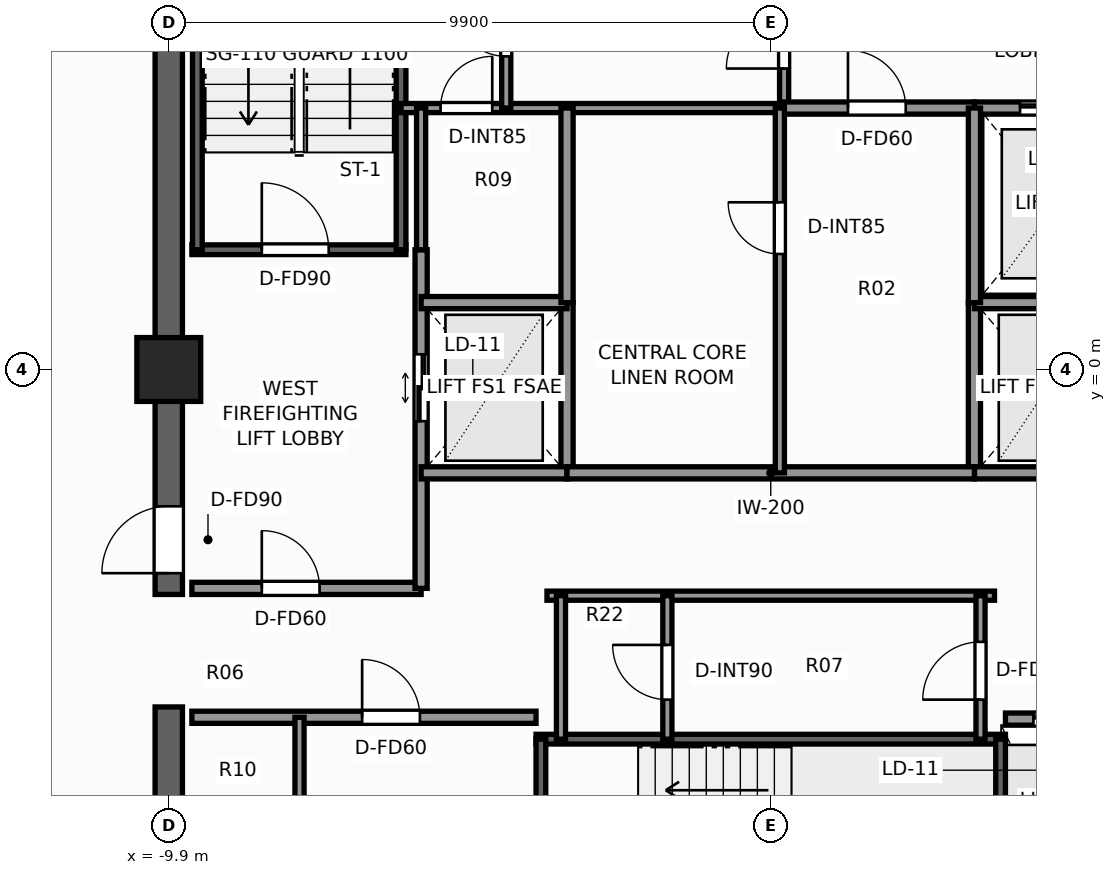
"""IFC4 building model, lengths in metres.
Left out: names, types, materials, properties, quantities, classifications, styles, units other than length and angle.
Written with IfcOpenShell. Run it as: python <this file> out.ifc"""

import sys

from ifc_helpers import new_model, si_unit, direction, frame, frame_2d, origin, origin_2d, place, context, subcontext, project, spatial, rectangle, extrude, element, fill, save


model = new_model("IFC4")
c1 = context("Model", 3, precision=1e-05, world=origin(), true_north=direction((0.0, 1.0)))
c2 = subcontext(c1, "Body", "Model", "MODEL_VIEW")
j1 = project(units=[si_unit("LENGTHUNIT", "METRE"), si_unit("PLANEANGLEUNIT", "RADIAN")], contexts=[c1])
p1 = place(None, origin())
s1 = spatial("IfcSite", under=j1, at=p1, CompositionType="ELEMENT")
p2 = place(p1, origin())
s2 = spatial("IfcBuilding", under=s1, at=p2, CompositionType="ELEMENT")
p3 = place(p2, frame((0.0, 0.0, 213.0)))
s3 = spatial("IfcBuildingStorey", under=s2, at=p3, CompositionType="ELEMENT", Elevation=213.0)
p4 = place(p3, frame((-9.9, -9.675, 0.0), z_axis=(0.0, 0.0, 1.0), x_axis=(0.0, 1.0, 0.0)))
e1 = element("IfcWall", 1, at=p4, inside=s3, PredefinedType="SHEAR", context=c2, shape_type="SweptSolid", body=[
    extrude(rectangle(XDim=4.125, YDim=0.45, at=frame_2d((2.062, 0.0))), origin(), (0.0, 0.0, 1.0), 3.3),
])
p5 = place(p3, frame((-9.9, -3.7, 0.0), z_axis=(0.0, 0.0, 1.0), x_axis=(0.0, 1.0, 0.0)))
e2 = element("IfcWall", 2, at=p5, inside=s3, PredefinedType="SHEAR", context=c2, shape_type="SweptSolid", body=[
    extrude(rectangle(XDim=13.375, YDim=0.45, at=frame_2d((6.688, 0.0))), origin(), (0.0, 0.0, 1.0), 3.3),
])
p6 = place(p5, frame((0.35, 0.0, 0.0)))
e3 = element("IfcOpeningElement", 3, at=p6, cuts=e2, PredefinedType="OPENING", context=c2, shape_type="SweptSolid", body=[
    extrude(rectangle(XDim=1.1, YDim=2.2, at=frame_2d((0.55, 1.1))), frame((0.0, 0.235, 0.0), z_axis=(0.0, -1.0, 0.0), x_axis=(1.0, 0.0, 0.0)), (0.0, 0.0, 1.0), 0.47),
])
p7 = place(p3, frame((-9.9, 0.0, 0.0), z_axis=(0.0, 0.0, 1.0), x_axis=(1.0, 0.0, 0.0)))
e4 = element("IfcColumn", 4, at=p7, inside=s3, PredefinedType="COLUMN", context=c2, shape_type="SweptSolid", body=[
    extrude(rectangle(XDim=1.05, YDim=1.05, at=origin_2d()), origin(), (0.0, 0.0, 1.0), 3.3),
])
p8 = place(p3, frame((-9.52, 1.97, 0.0), z_axis=(0.0, 0.0, 1.0), x_axis=(1.0, 0.0, 0.0)))
e5 = element("IfcWall", 5, at=p8, inside=s3, PredefinedType="SHEAR", context=c2, shape_type="SweptSolid", body=[
    extrude(rectangle(XDim=3.52, YDim=0.16, at=frame_2d((1.76, 0.0))), origin(), (0.0, 0.0, 1.0), 3.3),
])
p9 = place(p8, frame((1.15, 0.0, 0.0)))
e6 = element("IfcOpeningElement", 6, at=p9, cuts=e5, PredefinedType="OPENING", context=c2, shape_type="SweptSolid", body=[
    extrude(rectangle(XDim=1.1, YDim=2.2, at=frame_2d((0.55, 1.1))), frame((0.0, 0.09, 0.0), z_axis=(0.0, -1.0, 0.0), x_axis=(1.0, 0.0, 0.0)), (0.0, 0.0, 1.0), 0.18),
])
for number, where, z_axis, x_axis in (
    (7, (-9.43, 1.97, 0.0), (0.0, 0.0, 1.0), (0.0, 1.0, 0.0)),
    (8, (-6.08, 1.97, 0.0), (0.0, 0.0, 1.0), (0.0, 1.0, 0.0)),
):
    element("IfcWall", number, at=place(p3, frame(where, z_axis=z_axis, x_axis=x_axis)), inside=s3, PredefinedType="SHEAR", context=c2, shape_type="SweptSolid", body=[
        extrude(rectangle(XDim=7.56, YDim=0.16, at=frame_2d((3.78, 0.0))), origin(), (0.0, 0.0, 1.0), 3.3),
    ])
p10 = place(p3, frame((-3.86, -6.08, 0.0), z_axis=(0.0, 0.0, 1.0), x_axis=(1.0, 0.0, 0.0)))
e9 = element("IfcWall", 9, at=p10, inside=s3, PredefinedType="SHEAR", context=c2, shape_type="SweptSolid", body=[
    extrude(rectangle(XDim=7.72, YDim=0.16, at=frame_2d((3.86, 0.0))), origin(), (0.0, 0.0, 1.0), 3.3),
])
for number, where, z_axis, x_axis in (
    (10, (-3.78, -9.43, 0.0), (0.0, 0.0, 1.0), (0.0, 1.0, 0.0)),
    (11, (3.78, -9.43, 0.0), (0.0, 0.0, 1.0), (0.0, 1.0, 0.0)),
):
    element("IfcWall", number, at=place(p3, frame(where, z_axis=z_axis, x_axis=x_axis)), inside=s3, PredefinedType="SHEAR", context=c2, shape_type="SweptSolid", body=[
        extrude(rectangle(XDim=3.35, YDim=0.16, at=frame_2d((1.675, 0.0))), origin(), (0.0, 0.0, 1.0), 3.3),
    ])
p11 = place(p3, frame((-9.52, -3.6, 0.0), z_axis=(0.0, 0.0, 1.0), x_axis=(1.0, 0.0, 0.0)))
e12 = element("IfcWall", 12, at=p11, inside=s3, PredefinedType="SOLIDWALL", context=c2, shape_type="SweptSolid", body=[
    extrude(rectangle(XDim=3.77, YDim=0.2, at=frame_2d((1.885, 0.0))), origin(), (0.0, 0.0, 1.0), 3.08),
])
p12 = place(p11, frame((1.15, 0.0, 0.0)))
e13 = element("IfcOpeningElement", 13, at=p12, cuts=e12, PredefinedType="OPENING", context=c2, shape_type="SweptSolid", body=[
    extrude(rectangle(XDim=0.95, YDim=2.06, at=frame_2d((0.475, 1.03))), frame((0.0, 0.11, 0.0), z_axis=(0.0, -1.0, 0.0), x_axis=(1.0, 0.0, 0.0)), (0.0, 0.0, 1.0), 0.22),
])
p13 = place(p3, frame((-5.75, -3.6, 0.0), z_axis=(0.0, 0.0, 1.0), x_axis=(0.0, 1.0, 0.0)))
e14 = element("IfcWall", 14, at=p13, inside=s3, PredefinedType="SOLIDWALL", context=c2, shape_type="SweptSolid", body=[
    extrude(rectangle(XDim=5.57, YDim=0.2, at=frame_2d((2.785, 0.0))), origin(), (0.0, 0.0, 1.0), 3.08),
])
p14 = place(p13, frame((2.75, 0.0, 0.0)))
e15 = element("IfcOpeningElement", 15, at=p14, cuts=e14, PredefinedType="OPENING", context=c2, shape_type="SweptSolid", body=[
    extrude(rectangle(XDim=1.1, YDim=2.2, at=frame_2d((0.55, 1.1))), frame((0.0, 0.11, 0.0), z_axis=(0.0, -1.0, 0.0), x_axis=(1.0, 0.0, 0.0)), (0.0, 0.0, 1.0), 0.22),
])
p15 = place(p3, frame((-3.35, -1.7, 0.0), z_axis=(0.0, 0.0, 1.0), x_axis=(0.0, 1.0, 0.0)))
e16 = element("IfcWall", 16, at=p15, inside=s3, PredefinedType="SOLIDWALL", context=c2, shape_type="SweptSolid", body=[
    extrude(rectangle(XDim=2.8, YDim=0.2, at=frame_2d((1.4, 0.0))), origin(), (0.0, 0.0, 1.0), 3.08),
])
for number, where, z_axis, x_axis in (
    (17, (-5.75, -1.7, 0.0), (0.0, 0.0, 1.0), (1.0, 0.0, 0.0)),
    (18, (-5.75, 1.1, 0.0), (0.0, 0.0, 1.0), (1.0, 0.0, 0.0)),
):
    element("IfcWall", number, at=place(p3, frame(where, z_axis=z_axis, x_axis=x_axis)), inside=s3, PredefinedType="SOLIDWALL", context=c2, shape_type="SweptSolid", body=[
        extrude(rectangle(XDim=2.4, YDim=0.2, at=frame_2d((1.2, 0.0))), origin(), (0.0, 0.0, 1.0), 3.08),
    ])
p16 = place(p3, frame((3.35, -1.7, 0.0), z_axis=(0.0, 0.0, 1.0), x_axis=(0.0, 1.0, 0.0)))
e19 = element("IfcWall", 19, at=p16, inside=s3, PredefinedType="SOLIDWALL", context=c2, shape_type="SweptSolid", body=[
    extrude(rectangle(XDim=2.8, YDim=0.2, at=frame_2d((1.4, 0.0))), origin(), (0.0, 0.0, 1.0), 3.08),
])
for number, where, z_axis, x_axis in (
    (20, (3.35, -1.7, 0.0), (0.0, 0.0, 1.0), (1.0, 0.0, 0.0)),
    (21, (3.35, 1.1, 0.0), (0.0, 0.0, 1.0), (1.0, 0.0, 0.0)),
):
    element("IfcWall", number, at=place(p3, frame(where, z_axis=z_axis, x_axis=x_axis)), inside=s3, PredefinedType="SOLIDWALL", context=c2, shape_type="SweptSolid", body=[
        extrude(rectangle(XDim=2.4, YDim=0.2, at=frame_2d((1.2, 0.0))), origin(), (0.0, 0.0, 1.0), 3.08),
    ])
p17 = place(p3, frame((3.35, 4.3, 0.0), z_axis=(0.0, 0.0, 1.0), x_axis=(1.0, 0.0, 0.0)))
e22 = element("IfcWall", 22, at=p17, inside=s3, PredefinedType="SOLIDWALL", context=c2, shape_type="SweptSolid", body=[
    extrude(rectangle(XDim=2.73, YDim=0.2, at=frame_2d((1.365, 0.0))), origin(), (0.0, 0.0, 1.0), 3.08),
])
p18 = place(p17, frame((0.75, 0.0, 0.0)))
e23 = element("IfcOpeningElement", 23, at=p18, cuts=e22, PredefinedType="OPENING", context=c2, shape_type="SweptSolid", body=[
    extrude(rectangle(XDim=1.2, YDim=2.25, at=frame_2d((0.6, 1.125))), frame((0.0, 0.11, 0.0), z_axis=(0.0, -1.0, 0.0), x_axis=(1.0, 0.0, 0.0)), (0.0, 0.0, 1.0), 0.22),
])
p19 = place(p3, frame((-6.08, 4.3, 0.0), z_axis=(0.0, 0.0, 1.0), x_axis=(1.0, 0.0, 0.0)))
e24 = element("IfcWall", 24, at=p19, inside=s3, PredefinedType="PARTITIONING", context=c2, shape_type="SweptSolid", body=[
    extrude(rectangle(XDim=6.3, YDim=0.15, at=frame_2d((3.15, 0.0))), origin(), (0.0, 0.0, 1.0), 3.08),
])
p20 = place(p19, frame((0.65, 0.0, 0.0)))
e25 = element("IfcOpeningElement", 25, at=p20, cuts=e24, PredefinedType="OPENING", context=c2, shape_type="SweptSolid", body=[
    extrude(rectangle(XDim=0.85, YDim=2.03, at=frame_2d((0.425, 1.015))), frame((0.0, 0.085, 0.0), z_axis=(0.0, -1.0, 0.0), x_axis=(1.0, 0.0, 0.0)), (0.0, 0.0, 1.0), 0.17),
])
p21 = place(p3, frame((0.22, 4.3, 0.0), z_axis=(0.0, 0.0, 1.0), x_axis=(0.0, 1.0, 0.0)))
e26 = element("IfcWall", 26, at=p21, inside=s3, PredefinedType="PARTITIONING", context=c2, shape_type="SweptSolid", body=[
    extrude(rectangle(XDim=5.22, YDim=0.15, at=frame_2d((2.61, 0.0))), origin(), (0.0, 0.0, 1.0), 3.08),
])
p22 = place(p21, frame((0.65, 0.0, 0.0)))
e27 = element("IfcOpeningElement", 27, at=p22, cuts=e26, PredefinedType="OPENING", context=c2, shape_type="SweptSolid", body=[
    extrude(rectangle(XDim=0.95, YDim=2.06, at=frame_2d((0.475, 1.03))), frame((0.0, 0.085, 0.0), z_axis=(0.0, -1.0, 0.0), x_axis=(1.0, 0.0, 0.0)), (0.0, 0.0, 1.0), 0.17),
])
p23 = place(p3, frame((-4.35, 4.3, 0.0), z_axis=(0.0, 0.0, 1.0), x_axis=(0.0, 1.0, 0.0)))
e28 = element("IfcWall", 28, at=p23, inside=s3, PredefinedType="PARTITIONING", context=c2, shape_type="SweptSolid", body=[
    extrude(rectangle(XDim=5.22, YDim=0.15, at=frame_2d((2.61, 0.0))), origin(), (0.0, 0.0, 1.0), 3.08),
])
p24 = place(p23, frame((0.85, 0.0, 0.0)))
e29 = element("IfcOpeningElement", 29, at=p24, cuts=e28, PredefinedType="OPENING", context=c2, shape_type="SweptSolid", body=[
    extrude(rectangle(XDim=0.85, YDim=2.03, at=frame_2d((0.425, 1.015))), frame((0.0, 0.085, 0.0), z_axis=(0.0, -1.0, 0.0), x_axis=(1.0, 0.0, 0.0)), (0.0, 0.0, 1.0), 0.17),
])
p25 = place(p3, frame((-9.52, -5.72, 0.0), z_axis=(0.0, 0.0, 1.0), x_axis=(1.0, 0.0, 0.0)))
e30 = element("IfcWall", 30, at=p25, inside=s3, PredefinedType="SOLIDWALL", context=c2, shape_type="SweptSolid", body=[
    extrude(rectangle(XDim=5.66, YDim=0.2, at=frame_2d((2.83, 0.0))), origin(), (0.0, 0.0, 1.0), 3.08),
])
p26 = place(p25, frame((2.8, 0.0, 0.0)))
e31 = element("IfcOpeningElement", 31, at=p26, cuts=e30, PredefinedType="OPENING", context=c2, shape_type="SweptSolid", body=[
    extrude(rectangle(XDim=0.95, YDim=2.06, at=frame_2d((0.475, 1.03))), frame((0.0, 0.11, 0.0), z_axis=(0.0, -1.0, 0.0), x_axis=(1.0, 0.0, 0.0)), (0.0, 0.0, 1.0), 0.22),
])
p27 = place(p3, frame((-7.75, -9.52, 0.0), z_axis=(0.0, 0.0, 1.0), x_axis=(0.0, 1.0, 0.0)))
e32 = element("IfcWall", 32, at=p27, inside=s3, PredefinedType="PARTITIONING", context=c2, shape_type="SweptSolid", body=[
    extrude(rectangle(XDim=3.8, YDim=0.15, at=frame_2d((1.9, 0.0))), origin(), (0.0, 0.0, 1.0), 3.08),
])
p28 = place(p27, frame((0.9, 0.0, 0.0)))
e33 = element("IfcOpeningElement", 33, at=p28, cuts=e32, PredefinedType="OPENING", context=c2, shape_type="SweptSolid", body=[
    extrude(rectangle(XDim=0.85, YDim=2.03, at=frame_2d((0.425, 1.015))), frame((0.0, 0.085, 0.0), z_axis=(0.0, -1.0, 0.0), x_axis=(1.0, 0.0, 0.0)), (0.0, 0.0, 1.0), 0.17),
])
p29 = place(p3, frame((3.86, -5.75, 0.0), z_axis=(0.0, 0.0, 1.0), x_axis=(1.0, 0.0, 0.0)))
e34 = element("IfcWall", 34, at=p29, inside=s3, PredefinedType="SOLIDWALL", context=c2, shape_type="SweptSolid", body=[
    extrude(rectangle(XDim=5.66, YDim=0.2, at=frame_2d((2.83, 0.0))), origin(), (0.0, 0.0, 1.0), 3.08),
])
p30 = place(p29, frame((0.46, 0.0, 0.0)))
e35 = element("IfcOpeningElement", 35, at=p30, cuts=e34, PredefinedType="OPENING", context=c2, shape_type="SweptSolid", body=[
    extrude(rectangle(XDim=1.1, YDim=2.2, at=frame_2d((0.55, 1.1))), frame((0.0, 0.11, 0.0), z_axis=(0.0, -1.0, 0.0), x_axis=(1.0, 0.0, 0.0)), (0.0, 0.0, 1.0), 0.22),
])
p31 = place(p29, frame((2.39, 0.0, 0.0)))
e36 = element("IfcOpeningElement", 36, at=p31, cuts=e34, PredefinedType="OPENING", context=c2, shape_type="SweptSolid", body=[
    extrude(rectangle(XDim=1.1, YDim=2.2, at=frame_2d((0.55, 1.1))), frame((0.0, 0.11, 0.0), z_axis=(0.0, -1.0, 0.0), x_axis=(1.0, 0.0, 0.0)), (0.0, 0.0, 1.0), 0.22),
])
p32 = place(p29, frame((4.32, 0.0, 0.0)))
e37 = element("IfcOpeningElement", 37, at=p32, cuts=e34, PredefinedType="OPENING", context=c2, shape_type="SweptSolid", body=[
    extrude(rectangle(XDim=1.1, YDim=2.2, at=frame_2d((0.55, 1.1))), frame((0.0, 0.11, 0.0), z_axis=(0.0, -1.0, 0.0), x_axis=(1.0, 0.0, 0.0)), (0.0, 0.0, 1.0), 0.22),
])
p33 = place(p3, frame((0.22, 4.3, 0.0), z_axis=(0.0, 0.0, 1.0), x_axis=(1.0, 0.0, 0.0)))
e38 = element("IfcWall", 38, at=p33, inside=s3, PredefinedType="SOLIDWALL", context=c2, shape_type="SweptSolid", body=[
    extrude(rectangle(XDim=3.13, YDim=0.2, at=frame_2d((1.565, 0.0))), origin(), (0.0, 0.0, 1.0), 3.08),
])
p34 = place(p33, frame((1.05, 0.0, 0.0)))
e39 = element("IfcOpeningElement", 39, at=p34, cuts=e38, PredefinedType="OPENING", context=c2, shape_type="SweptSolid", body=[
    extrude(rectangle(XDim=0.95, YDim=2.06, at=frame_2d((0.475, 1.03))), frame((0.0, 0.11, 0.0), z_axis=(0.0, -1.0, 0.0), x_axis=(1.0, 0.0, 0.0)), (0.0, 0.0, 1.0), 0.22),
])
p35 = place(p3, frame((-3.35, -1.7, 0.0), z_axis=(0.0, 0.0, 1.0), x_axis=(1.0, 0.0, 0.0)))
e40 = element("IfcWall", 40, at=p35, inside=s3, PredefinedType="SOLIDWALL", context=c2, shape_type="SweptSolid", body=[
    extrude(rectangle(XDim=6.7, YDim=0.2, at=frame_2d((3.35, 0.0))), origin(), (0.0, 0.0, 1.0), 3.08),
])
for number, where, z_axis, x_axis in (
    (41, (-3.35, 1.1, 0.0), (0.0, 0.0, 1.0), (0.0, 1.0, 0.0)),
    (42, (3.35, 1.1, 0.0), (0.0, 0.0, 1.0), (0.0, 1.0, 0.0)),
):
    element("IfcWall", number, at=place(p3, frame(where, z_axis=z_axis, x_axis=x_axis)), inside=s3, PredefinedType="SOLIDWALL", context=c2, shape_type="SweptSolid", body=[
        extrude(rectangle(XDim=3.2, YDim=0.2, at=frame_2d((1.6, 0.0))), origin(), (0.0, 0.0, 1.0), 3.08),
    ])
p36 = place(p3, frame((0.15, -1.7, 0.0), z_axis=(0.0, 0.0, 1.0), x_axis=(0.0, 1.0, 0.0)))
e43 = element("IfcWall", 43, at=p36, inside=s3, PredefinedType="PARTITIONING", context=c2, shape_type="SweptSolid", body=[
    extrude(rectangle(XDim=6.0, YDim=0.15, at=frame_2d((3.0, 0.0))), origin(), (0.0, 0.0, 1.0), 3.08),
])
p37 = place(p36, frame((3.6, 0.0, 0.0)))
e44 = element("IfcOpeningElement", 44, at=p37, cuts=e43, PredefinedType="OPENING", context=c2, shape_type="SweptSolid", body=[
    extrude(rectangle(XDim=0.85, YDim=2.03, at=frame_2d((0.425, 1.015))), frame((0.0, 0.085, 0.0), z_axis=(0.0, -1.0, 0.0), x_axis=(1.0, 0.0, 0.0)), (0.0, 0.0, 1.0), 0.17),
])
p38 = place(p3, frame((-3.68, -3.72, 0.0), z_axis=(0.0, 0.0, 1.0), x_axis=(1.0, 0.0, 0.0)))
e45 = element("IfcWall", 45, at=p38, inside=s3, PredefinedType="PARTITIONING", context=c2, shape_type="SweptSolid", body=[
    extrude(rectangle(XDim=7.36, YDim=0.15, at=frame_2d((3.68, 0.0))), origin(), (0.0, 0.0, 1.0), 3.08),
])
p39 = place(p3, frame((3.45, -6.08, 0.0), z_axis=(0.0, 0.0, 1.0), x_axis=(0.0, 1.0, 0.0)))
e46 = element("IfcWall", 46, at=p39, inside=s3, PredefinedType="PARTITIONING", context=c2, shape_type="SweptSolid", body=[
    extrude(rectangle(XDim=2.36, YDim=0.15, at=frame_2d((1.18, 0.0))), origin(), (0.0, 0.0, 1.0), 3.08),
])
p40 = place(p39, frame((0.65, 0.0, 0.0)))
e47 = element("IfcOpeningElement", 47, at=p40, cuts=e46, PredefinedType="OPENING", context=c2, shape_type="SweptSolid", body=[
    extrude(rectangle(XDim=0.95, YDim=2.06, at=frame_2d((0.475, 1.03))), frame((0.0, 0.085, 0.0), z_axis=(0.0, -1.0, 0.0), x_axis=(1.0, 0.0, 0.0)), (0.0, 0.0, 1.0), 0.17),
])
p41 = place(p3, frame((-3.45, -6.08, 0.0), z_axis=(0.0, 0.0, 1.0), x_axis=(0.0, 1.0, 0.0)))
e48 = element("IfcWall", 48, at=p41, inside=s3, PredefinedType="PARTITIONING", context=c2, shape_type="SweptSolid", body=[
    extrude(rectangle(XDim=2.36, YDim=0.15, at=frame_2d((1.18, 0.0))), origin(), (0.0, 0.0, 1.0), 3.08),
])
p42 = place(p3, frame((-1.7, -6.08, 0.0), z_axis=(0.0, 0.0, 1.0), x_axis=(0.0, 1.0, 0.0)))
e49 = element("IfcWall", 49, at=p42, inside=s3, PredefinedType="PARTITIONING", context=c2, shape_type="SweptSolid", body=[
    extrude(rectangle(XDim=2.36, YDim=0.15, at=frame_2d((1.18, 0.0))), origin(), (0.0, 0.0, 1.0), 3.08),
])
p43 = place(p42, frame((0.65, 0.0, 0.0)))
e50 = element("IfcOpeningElement", 50, at=p43, cuts=e49, PredefinedType="OPENING", context=c2, shape_type="SweptSolid", body=[
    extrude(rectangle(XDim=0.9, YDim=2.06, at=frame_2d((0.45, 1.03))), frame((0.0, 0.085, 0.0), z_axis=(0.0, -1.0, 0.0), x_axis=(1.0, 0.0, 0.0)), (0.0, 0.0, 1.0), 0.17),
])
p44 = place(p3, frame((-5.75, 1.97, 0.0), z_axis=(0.0, 0.0, 1.0), x_axis=(0.0, 1.0, 0.0)))
e51 = element("IfcWall", 51, at=p44, inside=s3, PredefinedType="PARTITIONING", context=c2, shape_type="SweptSolid", body=[
    extrude(rectangle(XDim=2.33, YDim=0.15, at=frame_2d((1.165, 0.0))), origin(), (0.0, 0.0, 1.0), 3.08),
])
p45 = place(p9, origin())
e52 = element("IfcDoor", 52, at=p45, inside=s3, OperationType="SINGLE_SWING_LEFT", PredefinedType="DOOR", context=c2, shape_type="SweptSolid", body=[
    extrude(rectangle(XDim=1.1, YDim=2.2, at=frame_2d((0.55, 1.1))), frame((0.0, 0.025, 0.0), z_axis=(0.0, -1.0, 0.0), x_axis=(1.0, 0.0, 0.0)), (0.0, 0.0, 1.0), 0.05),
])
fill(e6, e52)
p46 = place(p6, origin())
e53 = element("IfcDoor", 53, at=p46, inside=s3, OperationType="SINGLE_SWING_LEFT", PredefinedType="DOOR", context=c2, shape_type="SweptSolid", body=[
    extrude(rectangle(XDim=1.1, YDim=2.2, at=frame_2d((0.55, 1.1))), frame((0.0, 0.025, 0.0), z_axis=(0.0, -1.0, 0.0), x_axis=(1.0, 0.0, 0.0)), (0.0, 0.0, 1.0), 0.05),
])
fill(e3, e53)
p47 = place(p14, origin())
e54 = element("IfcDoor", 54, at=p47, inside=s3, OperationType="DOUBLE_DOOR_SLIDING", PredefinedType="DOOR", context=c2, shape_type="SweptSolid", body=[
    extrude(rectangle(XDim=1.1, YDim=2.2, at=frame_2d((0.55, 1.1))), frame((0.0, 0.025, 0.0), z_axis=(0.0, -1.0, 0.0), x_axis=(1.0, 0.0, 0.0)), (0.0, 0.0, 1.0), 0.05),
])
fill(e15, e54)
p48 = place(p18, origin())
e55 = element("IfcDoor", 55, at=p48, inside=s3, OperationType="DOUBLE_DOOR_SLIDING", PredefinedType="DOOR", context=c2, shape_type="SweptSolid", body=[
    extrude(rectangle(XDim=1.2, YDim=2.25, at=frame_2d((0.6, 1.125))), frame((0.0, 0.025, 0.0), z_axis=(0.0, -1.0, 0.0), x_axis=(1.0, 0.0, 0.0)), (0.0, 0.0, 1.0), 0.05),
])
fill(e23, e55)
p49 = place(p22, origin())
e56 = element("IfcDoor", 56, at=p49, inside=s3, OperationType="SINGLE_SWING_LEFT", PredefinedType="DOOR", context=c2, shape_type="SweptSolid", body=[
    extrude(rectangle(XDim=0.95, YDim=2.06, at=frame_2d((0.475, 1.03))), frame((0.0, 0.025, 0.0), z_axis=(0.0, -1.0, 0.0), x_axis=(1.0, 0.0, 0.0)), (0.0, 0.0, 1.0), 0.05),
])
fill(e27, e56)
p50 = place(p24, origin())
e57 = element("IfcDoor", 57, at=p50, inside=s3, OperationType="SINGLE_SWING_RIGHT", PredefinedType="DOOR", context=c2, shape_type="SweptSolid", body=[
    extrude(rectangle(XDim=0.85, YDim=2.03, at=frame_2d((0.425, 1.015))), frame((0.0, 0.025, 0.0), z_axis=(0.0, -1.0, 0.0), x_axis=(1.0, 0.0, 0.0)), (0.0, 0.0, 1.0), 0.05),
])
fill(e29, e57)
p51 = place(p26, origin())
e58 = element("IfcDoor", 58, at=p51, inside=s3, OperationType="SINGLE_SWING_LEFT", PredefinedType="DOOR", context=c2, shape_type="SweptSolid", body=[
    extrude(rectangle(XDim=0.95, YDim=2.06, at=frame_2d((0.475, 1.03))), frame((0.0, 0.025, 0.0), z_axis=(0.0, -1.0, 0.0), x_axis=(1.0, 0.0, 0.0)), (0.0, 0.0, 1.0), 0.05),
])
fill(e31, e58)
p52 = place(p12, origin())
e59 = element("IfcDoor", 59, at=p52, inside=s3, OperationType="SINGLE_SWING_LEFT", PredefinedType="DOOR", context=c2, shape_type="SweptSolid", body=[
    extrude(rectangle(XDim=0.95, YDim=2.06, at=frame_2d((0.475, 1.03))), frame((0.0, 0.025, 0.0), z_axis=(0.0, -1.0, 0.0), x_axis=(1.0, 0.0, 0.0)), (0.0, 0.0, 1.0), 0.05),
])
fill(e13, e59)
p53 = place(p30, origin())
e60 = element("IfcDoor", 60, at=p53, inside=s3, OperationType="DOUBLE_DOOR_SLIDING", PredefinedType="DOOR", context=c2, shape_type="SweptSolid", body=[
    extrude(rectangle(XDim=1.1, YDim=2.2, at=frame_2d((0.55, 1.1))), frame((0.0, 0.025, 0.0), z_axis=(0.0, -1.0, 0.0), x_axis=(1.0, 0.0, 0.0)), (0.0, 0.0, 1.0), 0.05),
])
fill(e35, e60)
p54 = place(p34, origin())
e61 = element("IfcDoor", 61, at=p54, inside=s3, OperationType="SINGLE_SWING_LEFT", PredefinedType="DOOR", context=c2, shape_type="SweptSolid", body=[
    extrude(rectangle(XDim=0.95, YDim=2.06, at=frame_2d((0.475, 1.03))), frame((0.0, 0.025, 0.0), z_axis=(0.0, -1.0, 0.0), x_axis=(1.0, 0.0, 0.0)), (0.0, 0.0, 1.0), 0.05),
])
fill(e39, e61)
p55 = place(p37, origin())
e62 = element("IfcDoor", 62, at=p55, inside=s3, OperationType="SINGLE_SWING_RIGHT", PredefinedType="DOOR", context=c2, shape_type="SweptSolid", body=[
    extrude(rectangle(XDim=0.85, YDim=2.03, at=frame_2d((0.425, 1.015))), frame((0.0, 0.025, 0.0), z_axis=(0.0, -1.0, 0.0), x_axis=(1.0, 0.0, 0.0)), (0.0, 0.0, 1.0), 0.05),
])
fill(e44, e62)
p56 = place(p40, origin())
e63 = element("IfcDoor", 63, at=p56, inside=s3, OperationType="SINGLE_SWING_LEFT", PredefinedType="DOOR", context=c2, shape_type="SweptSolid", body=[
    extrude(rectangle(XDim=0.95, YDim=2.06, at=frame_2d((0.475, 1.03))), frame((0.0, 0.025, 0.0), z_axis=(0.0, -1.0, 0.0), x_axis=(1.0, 0.0, 0.0)), (0.0, 0.0, 1.0), 0.05),
])
fill(e47, e63)
p57 = place(p43, origin())
e64 = element("IfcDoor", 64, at=p57, inside=s3, OperationType="SINGLE_SWING_RIGHT", PredefinedType="DOOR", context=c2, shape_type="SweptSolid", body=[
    extrude(rectangle(XDim=0.9, YDim=2.06, at=frame_2d((0.45, 1.03))), frame((0.0, 0.025, 0.0), z_axis=(0.0, -1.0, 0.0), x_axis=(1.0, 0.0, 0.0)), (0.0, 0.0, 1.0), 0.05),
])
fill(e50, e64)
p58 = place(p20, origin())
e65 = element("IfcDoor", 65, at=p58, inside=s3, OperationType="SINGLE_SWING_RIGHT", PredefinedType="DOOR", context=c2, shape_type="SweptSolid", body=[
    extrude(rectangle(XDim=0.85, YDim=2.03, at=frame_2d((0.425, 1.015))), frame((0.0, 0.025, 0.0), z_axis=(0.0, -1.0, 0.0), x_axis=(1.0, 0.0, 0.0)), (0.0, 0.0, 1.0), 0.05),
])
fill(e25, e65)
save(model, sys.argv[1])
